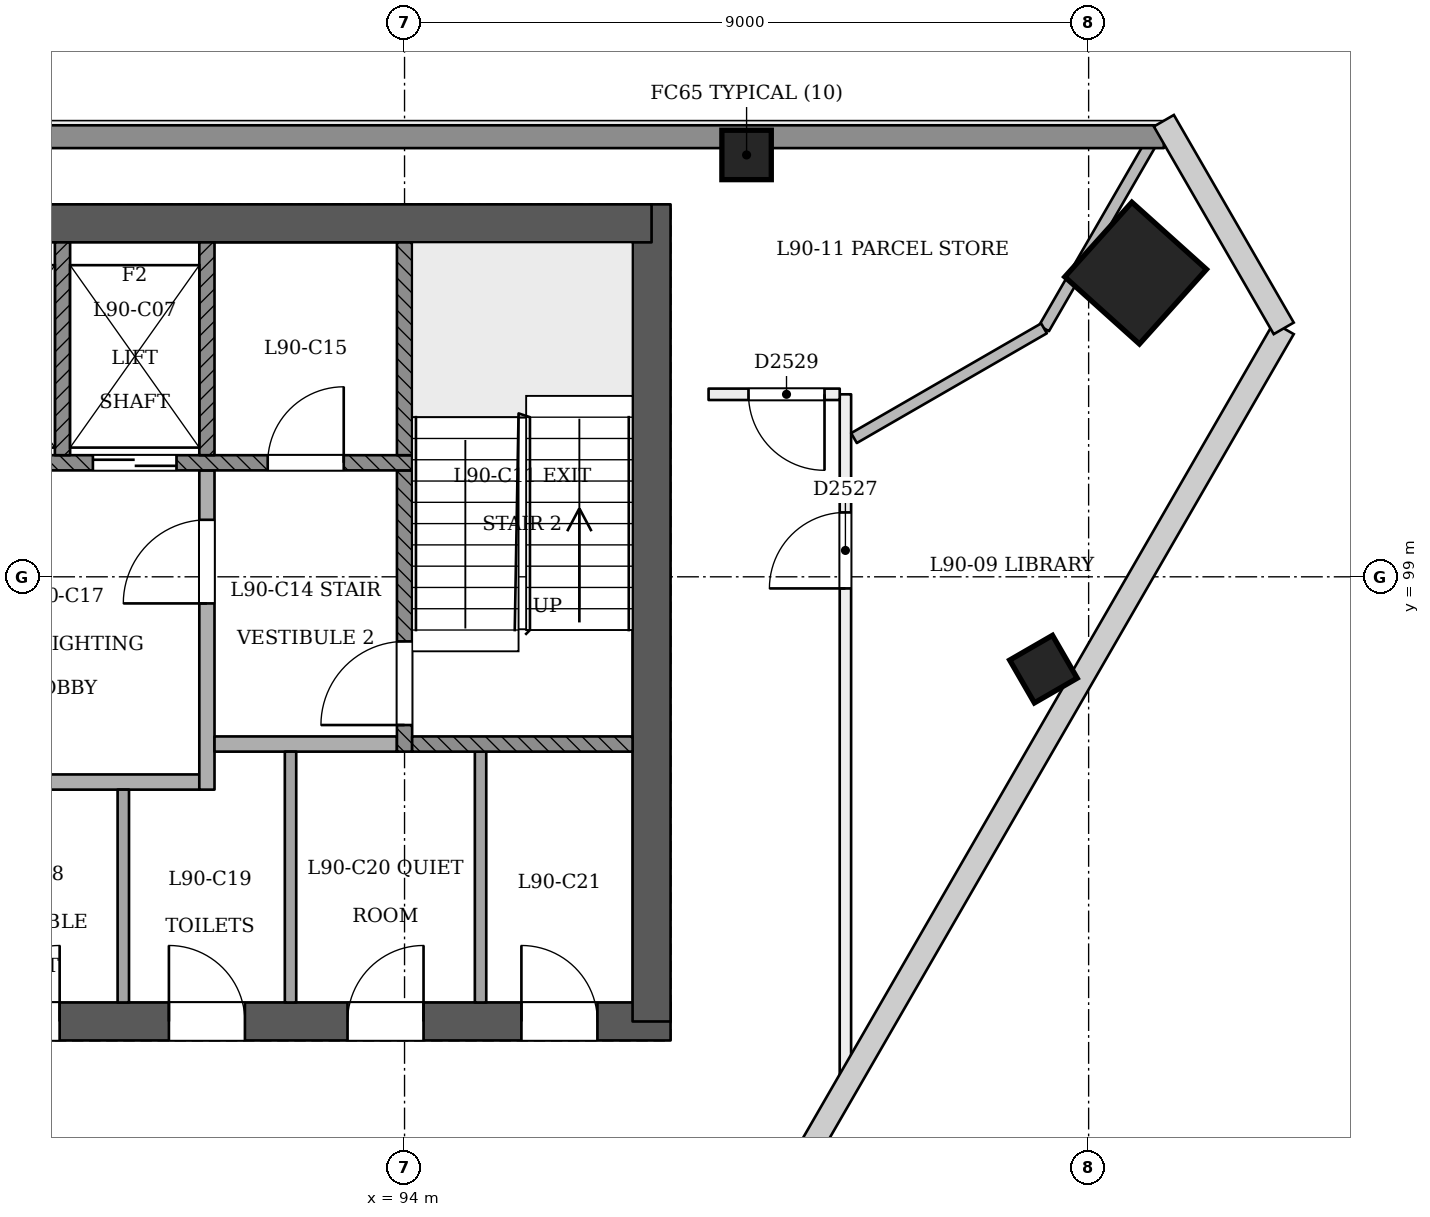
"""IFC4 building model, lengths in metres.
Left out: names, types, materials, properties, quantities, classifications, styles, units other than length and angle.
Written with IfcOpenShell. Run it as: python <this file> out.ifc"""

import sys

from ifc_helpers import new_model, si_unit, direction, frame, frame_2d, origin, origin_2d, place, context, subcontext, project, spatial, rectangle, extrude, element, fill, save


model = new_model("IFC4")
c1 = context("Model", 3, precision=1e-05, world=origin(), true_north=direction((0.0, 1.0)))
c2 = subcontext(c1, "Body", "Model", "MODEL_VIEW")
j1 = project(units=[si_unit("LENGTHUNIT", "METRE"), si_unit("PLANEANGLEUNIT", "RADIAN")], contexts=[c1])
p1 = place(None, origin())
s1 = spatial("IfcSite", under=j1, at=p1, CompositionType="ELEMENT")
p2 = place(p1, origin())
s2 = spatial("IfcBuilding", under=s1, at=p2, CompositionType="ELEMENT")
p3 = place(p2, frame((0.0, 0.0, 347.2)))
s3 = spatial("IfcBuildingStorey", under=s2, at=p3, CompositionType="ELEMENT", Elevation=347.2)
p4 = place(p3, frame((72.75, 93.15, 0.0), z_axis=(0.0, 0.0, 1.0), x_axis=(1.0, 0.0, 0.0)))
e1 = element("IfcWall", 1, at=p4, inside=s3, PredefinedType="SHEAR", context=c2, shape_type="SweptSolid", body=[
    extrude(rectangle(XDim=24.75, YDim=0.5, at=frame_2d((12.375, 0.0))), origin(), (0.0, 0.0, 1.0), 3.6),
])
p5 = place(p4, frame((1.05, 0.0, 0.0)))
e2 = element("IfcOpeningElement", 2, at=p5, cuts=e1, PredefinedType="OPENING", context=c2, shape_type="SweptSolid", body=[
    extrude(rectangle(XDim=1.2, YDim=2.1, at=frame_2d((0.6, 1.05))), frame((0.0, 0.26, 0.0), z_axis=(0.0, -1.0, 0.0), x_axis=(1.0, 0.0, 0.0)), (0.0, 0.0, 1.0), 0.521),
])
p6 = place(p4, frame((3.25, 0.0, 0.0)))
e3 = element("IfcOpeningElement", 3, at=p6, cuts=e1, PredefinedType="OPENING", context=c2, shape_type="SweptSolid", body=[
    extrude(rectangle(XDim=1.2, YDim=2.1, at=frame_2d((0.6, 1.05))), frame((0.0, 0.26, 0.0), z_axis=(0.0, -1.0, 0.0), x_axis=(1.0, 0.0, 0.0)), (0.0, 0.0, 1.0), 0.521),
])
p7 = place(p4, frame((13.25, 0.0, 0.0)))
e4 = element("IfcOpeningElement", 4, at=p7, cuts=e1, PredefinedType="OPENING", context=c2, shape_type="SweptSolid", body=[
    extrude(rectangle(XDim=1.2, YDim=2.1, at=frame_2d((0.6, 1.05))), frame((0.0, 0.26, 0.0), z_axis=(0.0, -1.0, 0.0), x_axis=(1.0, 0.0, 0.0)), (0.0, 0.0, 1.0), 0.521),
])
p8 = place(p4, frame((15.712, 0.0, 0.0)))
e5 = element("IfcOpeningElement", 5, at=p8, cuts=e1, PredefinedType="OPENING", context=c2, shape_type="SweptSolid", body=[
    extrude(rectangle(XDim=1.0, YDim=2.1, at=frame_2d((0.5, 1.05))), frame((0.0, 0.26, 0.0), z_axis=(0.0, -1.0, 0.0), x_axis=(1.0, 0.0, 0.0)), (0.0, 0.0, 1.0), 0.521),
])
p9 = place(p4, frame((18.15, 0.0, 0.0)))
e6 = element("IfcOpeningElement", 6, at=p9, cuts=e1, PredefinedType="OPENING", context=c2, shape_type="SweptSolid", body=[
    extrude(rectangle(XDim=1.0, YDim=2.1, at=frame_2d((0.5, 1.05))), frame((0.0, 0.26, 0.0), z_axis=(0.0, -1.0, 0.0), x_axis=(1.0, 0.0, 0.0)), (0.0, 0.0, 1.0), 0.521),
])
p10 = place(p4, frame((20.5, 0.0, 0.0)))
e7 = element("IfcOpeningElement", 7, at=p10, cuts=e1, PredefinedType="OPENING", context=c2, shape_type="SweptSolid", body=[
    extrude(rectangle(XDim=1.0, YDim=2.1, at=frame_2d((0.5, 1.05))), frame((0.0, 0.26, 0.0), z_axis=(0.0, -1.0, 0.0), x_axis=(1.0, 0.0, 0.0)), (0.0, 0.0, 1.0), 0.521),
])
p11 = place(p4, frame((22.788, 0.0, 0.0)))
e8 = element("IfcOpeningElement", 8, at=p11, cuts=e1, PredefinedType="OPENING", context=c2, shape_type="SweptSolid", body=[
    extrude(rectangle(XDim=1.0, YDim=2.1, at=frame_2d((0.5, 1.05))), frame((0.0, 0.26, 0.0), z_axis=(0.0, -1.0, 0.0), x_axis=(1.0, 0.0, 0.0)), (0.0, 0.0, 1.0), 0.521),
])
p12 = place(p3, frame((97.25, 93.15, 0.0), z_axis=(0.0, 0.0, 1.0), x_axis=(0.0, 1.0, 0.0)))
e9 = element("IfcWall", 9, at=p12, inside=s3, PredefinedType="SHEAR", context=c2, shape_type="SweptSolid", body=[
    extrude(rectangle(XDim=10.75, YDim=0.5, at=frame_2d((5.375, 0.0))), origin(), (0.0, 0.0, 1.0), 3.6),
])
p13 = place(p3, frame((97.25, 103.65, 0.0), z_axis=(0.0, 0.0, 1.0), x_axis=(-1.0, 0.0, 0.0)))
e10 = element("IfcWall", 10, at=p13, inside=s3, PredefinedType="SHEAR", context=c2, shape_type="SweptSolid", body=[
    extrude(rectangle(XDim=24.75, YDim=0.5, at=frame_2d((12.375, 0.0))), origin(), (0.0, 0.0, 1.0), 3.6),
])
p14 = place(p3, frame((103.653, 102.984, 0.0), z_axis=(-0.028401814599, 0.009218727412, 0.999554076572), x_axis=(0.500749996351, -0.865306994766, 0.022209141446)))
e11 = element("IfcColumn", 11, at=p14, inside=s3, PredefinedType="COLUMN", context=c2, shape_type="SweptSolid", body=[
    extrude(rectangle(XDim=1.32, YDim=1.32, at=origin_2d()), origin(), (0.0, 0.0, 1.0), 3.602),
])
p15 = place(p3, frame((98.5, 104.55, 0.0), z_axis=(0.0, 0.0, 1.0), x_axis=(1.0, 0.0, 0.0)))
e12 = element("IfcColumn", 12, at=p15, inside=s3, PredefinedType="COLUMN", context=c2, shape_type="SweptSolid", body=[
    extrude(rectangle(XDim=0.65, YDim=0.65, at=origin_2d()), origin(), (0.0, 0.0, 1.0), 3.6),
])
p16 = place(p3, frame((102.432, 97.739, 0.0), z_axis=(-0.022207898747, 0.03842102728, 0.99901483167), x_axis=(-0.499822035418, -0.865843868473, 0.022188473118)))
e13 = element("IfcColumn", 13, at=p16, inside=s3, PredefinedType="COLUMN", context=c2, shape_type="SweptSolid", body=[
    extrude(rectangle(XDim=0.65, YDim=0.65, at=origin_2d()), origin(), (0.0, 0.0, 1.0), 3.584),
])
p17 = place(p3, frame((99.8, 92.408, 0.0), z_axis=(0.0, 0.0, 1.0), x_axis=(2.714883e-05, 0.999999999631, 0.0)))
e14 = element("IfcWall", 14, at=p17, inside=s3, PredefinedType="PARTITIONING", context=c2, shape_type="SweptSolid", body=[
    extrude(rectangle(XDim=8.993, YDim=0.15, at=frame_2d((4.496, 0.0))), origin(), (0.0, 0.0, 1.0), 2.7),
])
p18 = place(p17, frame((6.439, 0.0, 0.0)))
e15 = element("IfcOpeningElement", 15, at=p18, cuts=e14, PredefinedType="OPENING", context=c2, shape_type="SweptSolid", body=[
    extrude(rectangle(XDim=1.0, YDim=2.1, at=frame_2d((0.5, 1.05))), frame((0.0, 0.085, 0.0), z_axis=(0.0, -1.0, 0.0), x_axis=(1.0, 0.0, 0.0)), (0.0, 0.0, 1.0), 0.171),
])
p19 = place(p3, frame((99.725, 101.401, 0.0), z_axis=(0.0, 0.0, 1.0), x_axis=(-1.0, 0.0, 0.0)))
e16 = element("IfcWall", 16, at=p19, inside=s3, PredefinedType="PARTITIONING", context=c2, shape_type="SweptSolid", body=[
    extrude(rectangle(XDim=1.725, YDim=0.15, at=frame_2d((0.863, 0.0))), origin(), (0.0, 0.0, 1.0), 3.2),
])
p20 = place(p19, frame((0.2, 0.0, 0.0)))
e17 = element("IfcOpeningElement", 17, at=p20, cuts=e16, PredefinedType="OPENING", context=c2, shape_type="SweptSolid", body=[
    extrude(rectangle(XDim=1.0, YDim=2.1, at=frame_2d((0.5, 1.05))), frame((0.0, 0.085, 0.0), z_axis=(0.0, -1.0, 0.0), x_axis=(1.0, 0.0, 0.0)), (0.0, 0.0, 1.0), 0.171),
])
p21 = place(p3, frame((103.932, 104.9, 0.0), z_axis=(0.0, 0.0, 1.0), x_axis=(-0.500019211527, -0.86601431172, 0.0)))
e18 = element("IfcWall", 18, at=p21, inside=s3, PredefinedType="PARTITIONING", context=c2, shape_type="SweptSolid", body=[
    extrude(rectangle(XDim=3.039, YDim=0.15, at=frame_2d((1.519, 0.0))), origin(), (0.0, 0.0, 1.0), 2.7),
])
p22 = place(p3, frame((102.413, 102.269, 0.0), z_axis=(0.0, 0.0, 1.0), x_axis=(-0.866027848477, -0.499995765644, 0.0)))
e19 = element("IfcWall", 19, at=p22, inside=s3, PredefinedType="PARTITIONING", context=c2, shape_type="SweptSolid", body=[
    extrude(rectangle(XDim=2.887, YDim=0.15, at=frame_2d((1.443, 0.0))), origin(), (0.0, 0.0, 1.0), 3.2),
])
p23 = place(p3, frame((66.01, 104.79, 0.0), z_axis=(0.0, 0.0, 1.0), x_axis=(1.0, 0.0, 0.0)))
e20 = element("IfcWall", 20, at=p23, inside=s3, PredefinedType="SOLIDWALL", context=c2, shape_type="SweptSolid", body=[
    extrude(rectangle(XDim=37.979, YDim=0.3, at=frame_2d((18.99, 0.0))), origin(), (0.0, 0.0, 1.0), 2.7),
])
p24 = place(p3, frame((90.3, 93.4, 0.0), z_axis=(0.0, 0.0, 1.0), x_axis=(0.0, 1.0, 0.0)))
e21 = element("IfcWall", 21, at=p24, inside=s3, PredefinedType="PARTITIONING", context=c2, shape_type="SweptSolid", body=[
    extrude(rectangle(XDim=2.8, YDim=0.15, at=frame_2d((1.4, 0.0))), origin(), (0.0, 0.0, 1.0), 3.2),
])
for number, where, z_axis, x_axis in (
    (22, (92.5, 93.4, 0.0), (0.0, 0.0, 1.0), (0.0, 1.0, 0.0)),
    (23, (95.0, 93.4, 0.0), (0.0, 0.0, 1.0), (0.0, 1.0, 0.0)),
):
    element("IfcWall", number, at=place(p3, frame(where, z_axis=z_axis, x_axis=x_axis)), inside=s3, PredefinedType="PARTITIONING", context=c2, shape_type="SweptSolid", body=[
        extrude(rectangle(XDim=3.3, YDim=0.15, at=frame_2d((1.65, 0.0))), origin(), (0.0, 0.0, 1.0), 3.2),
    ])
p25 = place(p3, frame((87.7, 96.3, 0.0), z_axis=(0.0, 0.0, 1.0), x_axis=(1.0, 0.0, 0.0)))
e24 = element("IfcWall", 24, at=p25, inside=s3, PredefinedType="PARTITIONING", context=c2, shape_type="SweptSolid", body=[
    extrude(rectangle(XDim=3.6, YDim=0.2, at=frame_2d((1.8, 0.0))), origin(), (0.0, 0.0, 1.0), 3.2),
])
p26 = place(p3, frame((91.4, 96.2, 0.0), z_axis=(0.0, 0.0, 1.0), x_axis=(0.0, 1.0, 0.0)))
e25 = element("IfcWall", 25, at=p26, inside=s3, PredefinedType="PARTITIONING", context=c2, shape_type="SweptSolid", body=[
    extrude(rectangle(XDim=4.2, YDim=0.2, at=frame_2d((2.1, 0.0))), origin(), (0.0, 0.0, 1.0), 3.2),
])
p27 = place(p26, frame((2.45, 0.0, 0.0)))
e26 = element("IfcOpeningElement", 26, at=p27, cuts=e25, PredefinedType="OPENING", context=c2, shape_type="SweptSolid", body=[
    extrude(rectangle(XDim=1.1, YDim=2.1, at=frame_2d((0.55, 1.05))), frame((0.0, 0.11, 0.0), z_axis=(0.0, -1.0, 0.0), x_axis=(1.0, 0.0, 0.0)), (0.0, 0.0, 1.0), 0.221),
])
p28 = place(p3, frame((91.5, 96.8, 0.0), z_axis=(0.0, 0.0, 1.0), x_axis=(1.0, 0.0, 0.0)))
e27 = element("IfcWall", 27, at=p28, inside=s3, PredefinedType="PARTITIONING", context=c2, shape_type="SweptSolid", body=[
    extrude(rectangle(XDim=2.4, YDim=0.2, at=frame_2d((1.2, 0.0))), origin(), (0.0, 0.0, 1.0), 3.2),
])
p29 = place(p3, frame((94.0, 96.7, 0.0), z_axis=(0.0, 0.0, 1.0), x_axis=(0.0, 1.0, 0.0)))
e28 = element("IfcWall", 28, at=p29, inside=s3, PredefinedType="SOLIDWALL", context=c2, shape_type="SweptSolid", body=[
    extrude(rectangle(XDim=3.7, YDim=0.2, at=frame_2d((1.85, 0.0))), origin(), (0.0, 0.0, 1.0), 3.2),
])
p30 = place(p29, frame((0.35, 0.0, 0.0)))
e29 = element("IfcOpeningElement", 29, at=p30, cuts=e28, PredefinedType="OPENING", context=c2, shape_type="SweptSolid", body=[
    extrude(rectangle(XDim=1.1, YDim=2.1, at=frame_2d((0.55, 1.05))), frame((0.0, 0.11, 0.0), z_axis=(0.0, -1.0, 0.0), x_axis=(1.0, 0.0, 0.0)), (0.0, 0.0, 1.0), 0.221),
])
p31 = place(p3, frame((94.1, 96.8, 0.0), z_axis=(0.0, 0.0, 1.0), x_axis=(1.0, 0.0, 0.0)))
e30 = element("IfcWall", 30, at=p31, inside=s3, PredefinedType="SOLIDWALL", context=c2, shape_type="SweptSolid", body=[
    extrude(rectangle(XDim=2.9, YDim=0.2, at=frame_2d((1.45, 0.0))), origin(), (0.0, 0.0, 1.0), 3.2),
])
p32 = place(p3, frame((75.9, 100.5, 0.0), z_axis=(0.0, 0.0, 1.0), x_axis=(1.0, 0.0, 0.0)))
e31 = element("IfcWall", 31, at=p32, inside=s3, PredefinedType="SOLIDWALL", context=c2, shape_type="SweptSolid", body=[
    extrude(rectangle(XDim=18.2, YDim=0.2, at=frame_2d((9.1, 0.0))), origin(), (0.0, 0.0, 1.0), 3.2),
])
p33 = place(p32, frame((2.6, 0.0, 0.0)))
e32 = element("IfcOpeningElement", 32, at=p33, cuts=e31, PredefinedType="OPENING", context=c2, shape_type="SweptSolid", body=[
    extrude(rectangle(XDim=1.1, YDim=2.1, at=frame_2d((0.55, 1.05))), frame((0.0, 0.11, 0.0), z_axis=(0.0, -1.0, 0.0), x_axis=(1.0, 0.0, 0.0)), (0.0, 0.0, 1.0), 0.221),
])
p34 = place(p32, frame((4.5, 0.0, 0.0)))
e33 = element("IfcOpeningElement", 33, at=p34, cuts=e31, PredefinedType="OPENING", context=c2, shape_type="SweptSolid", body=[
    extrude(rectangle(XDim=1.1, YDim=2.1, at=frame_2d((0.55, 1.05))), frame((0.0, 0.11, 0.0), z_axis=(0.0, -1.0, 0.0), x_axis=(1.0, 0.0, 0.0)), (0.0, 0.0, 1.0), 0.221),
])
p35 = place(p32, frame((6.4, 0.0, 0.0)))
e34 = element("IfcOpeningElement", 34, at=p35, cuts=e31, PredefinedType="OPENING", context=c2, shape_type="SweptSolid", body=[
    extrude(rectangle(XDim=1.1, YDim=2.1, at=frame_2d((0.55, 1.05))), frame((0.0, 0.11, 0.0), z_axis=(0.0, -1.0, 0.0), x_axis=(1.0, 0.0, 0.0)), (0.0, 0.0, 1.0), 0.221),
])
p36 = place(p32, frame((8.3, 0.0, 0.0)))
e35 = element("IfcOpeningElement", 35, at=p36, cuts=e31, PredefinedType="OPENING", context=c2, shape_type="SweptSolid", body=[
    extrude(rectangle(XDim=1.1, YDim=2.1, at=frame_2d((0.55, 1.05))), frame((0.0, 0.11, 0.0), z_axis=(0.0, -1.0, 0.0), x_axis=(1.0, 0.0, 0.0)), (0.0, 0.0, 1.0), 0.221),
])
p37 = place(p32, frame((10.2, 0.0, 0.0)))
e36 = element("IfcOpeningElement", 36, at=p37, cuts=e31, PredefinedType="OPENING", context=c2, shape_type="SweptSolid", body=[
    extrude(rectangle(XDim=1.1, YDim=2.1, at=frame_2d((0.55, 1.05))), frame((0.0, 0.11, 0.0), z_axis=(0.0, -1.0, 0.0), x_axis=(1.0, 0.0, 0.0)), (0.0, 0.0, 1.0), 0.221),
])
p38 = place(p32, frame((12.1, 0.0, 0.0)))
e37 = element("IfcOpeningElement", 37, at=p38, cuts=e31, PredefinedType="OPENING", context=c2, shape_type="SweptSolid", body=[
    extrude(rectangle(XDim=1.1, YDim=2.1, at=frame_2d((0.55, 1.05))), frame((0.0, 0.11, 0.0), z_axis=(0.0, -1.0, 0.0), x_axis=(1.0, 0.0, 0.0)), (0.0, 0.0, 1.0), 0.221),
])
p39 = place(p32, frame((14.0, 0.0, 0.0)))
e38 = element("IfcOpeningElement", 38, at=p39, cuts=e31, PredefinedType="OPENING", context=c2, shape_type="SweptSolid", body=[
    extrude(rectangle(XDim=1.1, YDim=2.1, at=frame_2d((0.55, 1.05))), frame((0.0, 0.11, 0.0), z_axis=(0.0, -1.0, 0.0), x_axis=(1.0, 0.0, 0.0)), (0.0, 0.0, 1.0), 0.221),
])
p40 = place(p32, frame((0.65, 0.0, 0.0)))
e39 = element("IfcOpeningElement", 39, at=p40, cuts=e31, PredefinedType="OPENING", context=c2, shape_type="SweptSolid", body=[
    extrude(rectangle(XDim=1.0, YDim=2.1, at=frame_2d((0.5, 1.05))), frame((0.0, 0.11, 0.0), z_axis=(0.0, -1.0, 0.0), x_axis=(1.0, 0.0, 0.0)), (0.0, 0.0, 1.0), 0.221),
])
p41 = place(p32, frame((16.3, 0.0, 0.0)))
e40 = element("IfcOpeningElement", 40, at=p41, cuts=e31, PredefinedType="OPENING", context=c2, shape_type="SweptSolid", body=[
    extrude(rectangle(XDim=1.0, YDim=2.1, at=frame_2d((0.5, 1.05))), frame((0.0, 0.11, 0.0), z_axis=(0.0, -1.0, 0.0), x_axis=(1.0, 0.0, 0.0)), (0.0, 0.0, 1.0), 0.221),
])
for number, where, z_axis, x_axis in (
    (41, (89.5, 100.6, 0.0), (0.0, 0.0, 1.0), (0.0, 1.0, 0.0)),
    (42, (91.4, 100.6, 0.0), (0.0, 0.0, 1.0), (0.0, 1.0, 0.0)),
    (43, (94.0, 100.6, 0.0), (0.0, 0.0, 1.0), (0.0, 1.0, 0.0)),
):
    element("IfcWall", number, at=place(p3, frame(where, z_axis=z_axis, x_axis=x_axis)), inside=s3, PredefinedType="SOLIDWALL", context=c2, shape_type="SweptSolid", body=[
        extrude(rectangle(XDim=2.8, YDim=0.2, at=frame_2d((1.4, 0.0))), origin(), (0.0, 0.0, 1.0), 3.2),
    ])
p42 = place(p18, origin())
e44 = element("IfcDoor", 44, at=p42, inside=s3, OperationType="SINGLE_SWING_LEFT", PredefinedType="NOTDEFINED", context=c2, shape_type="SweptSolid", body=[
    extrude(rectangle(XDim=1.0, YDim=2.1, at=frame_2d((0.5, 1.05))), frame((0.0, 0.025, 0.0), z_axis=(0.0, -1.0, 0.0), x_axis=(1.0, 0.0, 0.0)), (0.0, 0.0, 1.0), 0.05),
])
fill(e15, e44)
p43 = place(p20, origin())
e45 = element("IfcDoor", 45, at=p43, inside=s3, OperationType="SINGLE_SWING_LEFT", PredefinedType="NOTDEFINED", context=c2, shape_type="SweptSolid", body=[
    extrude(rectangle(XDim=1.0, YDim=2.1, at=frame_2d((0.5, 1.05))), frame((0.0, 0.025, 0.0), z_axis=(0.0, -1.0, 0.0), x_axis=(1.0, 0.0, 0.0)), (0.0, 0.0, 1.0), 0.05),
])
fill(e17, e45)
p44 = place(p39, origin())
e46 = element("IfcDoor", 46, at=p44, inside=s3, OperationType="SLIDING_TO_LEFT", PredefinedType="NOTDEFINED", context=c2, shape_type="SweptSolid", body=[
    extrude(rectangle(XDim=1.1, YDim=2.1, at=frame_2d((0.55, 1.05))), frame((0.0, 0.025, 0.0), z_axis=(0.0, -1.0, 0.0), x_axis=(1.0, 0.0, 0.0)), (0.0, 0.0, 1.0), 0.05),
])
fill(e38, e46)
p45 = place(p30, origin())
e47 = element("IfcDoor", 47, at=p45, inside=s3, OperationType="SINGLE_SWING_LEFT", PredefinedType="NOTDEFINED", context=c2, shape_type="SweptSolid", body=[
    extrude(rectangle(XDim=1.1, YDim=2.1, at=frame_2d((0.55, 1.05))), frame((0.0, 0.025, 0.0), z_axis=(0.0, -1.0, 0.0), x_axis=(1.0, 0.0, 0.0)), (0.0, 0.0, 1.0), 0.05),
])
fill(e29, e47)
p46 = place(p27, origin())
e48 = element("IfcDoor", 48, at=p46, inside=s3, OperationType="SINGLE_SWING_LEFT", PredefinedType="NOTDEFINED", context=c2, shape_type="SweptSolid", body=[
    extrude(rectangle(XDim=1.1, YDim=2.1, at=frame_2d((0.55, 1.05))), frame((0.0, 0.025, 0.0), z_axis=(0.0, -1.0, 0.0), x_axis=(1.0, 0.0, 0.0)), (0.0, 0.0, 1.0), 0.05),
])
fill(e26, e48)
p47 = place(p41, origin())
e49 = element("IfcDoor", 49, at=p47, inside=s3, OperationType="SINGLE_SWING_RIGHT", PredefinedType="NOTDEFINED", context=c2, shape_type="SweptSolid", body=[
    extrude(rectangle(XDim=1.0, YDim=2.1, at=frame_2d((0.5, 1.05))), frame((0.0, 0.025, 0.0), z_axis=(0.0, -1.0, 0.0), x_axis=(1.0, 0.0, 0.0)), (0.0, 0.0, 1.0), 0.05),
])
fill(e40, e49)
p48 = place(p8, origin())
e50 = element("IfcDoor", 50, at=p48, inside=s3, OperationType="SINGLE_SWING_RIGHT", PredefinedType="NOTDEFINED", context=c2, shape_type="SweptSolid", body=[
    extrude(rectangle(XDim=1.0, YDim=2.1, at=frame_2d((0.5, 1.05))), frame((0.0, 0.025, 0.0), z_axis=(0.0, -1.0, 0.0), x_axis=(1.0, 0.0, 0.0)), (0.0, 0.0, 1.0), 0.05),
])
fill(e5, e50)
p49 = place(p9, origin())
e51 = element("IfcDoor", 51, at=p49, inside=s3, OperationType="SINGLE_SWING_LEFT", PredefinedType="NOTDEFINED", context=c2, shape_type="SweptSolid", body=[
    extrude(rectangle(XDim=1.0, YDim=2.1, at=frame_2d((0.5, 1.05))), frame((0.0, 0.025, 0.0), z_axis=(0.0, -1.0, 0.0), x_axis=(1.0, 0.0, 0.0)), (0.0, 0.0, 1.0), 0.05),
])
fill(e6, e51)
p50 = place(p10, origin())
e52 = element("IfcDoor", 52, at=p50, inside=s3, OperationType="SINGLE_SWING_RIGHT", PredefinedType="NOTDEFINED", context=c2, shape_type="SweptSolid", body=[
    extrude(rectangle(XDim=1.0, YDim=2.1, at=frame_2d((0.5, 1.05))), frame((0.0, 0.025, 0.0), z_axis=(0.0, -1.0, 0.0), x_axis=(1.0, 0.0, 0.0)), (0.0, 0.0, 1.0), 0.05),
])
fill(e7, e52)
p51 = place(p11, origin())
e53 = element("IfcDoor", 53, at=p51, inside=s3, OperationType="SINGLE_SWING_LEFT", PredefinedType="NOTDEFINED", context=c2, shape_type="SweptSolid", body=[
    extrude(rectangle(XDim=1.0, YDim=2.1, at=frame_2d((0.5, 1.05))), frame((0.0, 0.025, 0.0), z_axis=(0.0, -1.0, 0.0), x_axis=(1.0, 0.0, 0.0)), (0.0, 0.0, 1.0), 0.05),
])
fill(e8, e53)
save(model, sys.argv[1])
